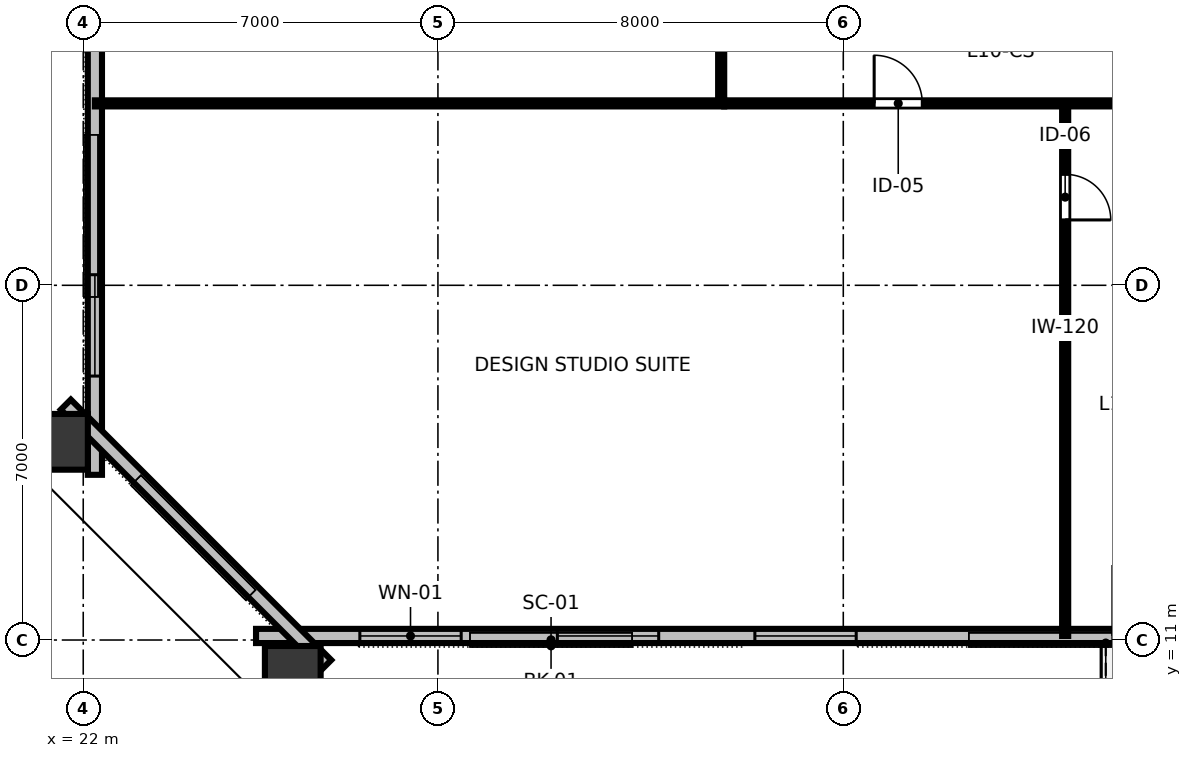
"""IFC4 building model, lengths in metres.
Left out: names, types, materials, properties, quantities, classifications, styles, units other than length and angle.
Written with IfcOpenShell. Run it as: python <this file> out.ifc"""

import sys

from ifc_helpers import new_model, si_unit, direction, frame, frame_2d, origin, origin_2d, place, context, subcontext, project, spatial, rectangle, hollow_rectangle, extrude, element, fill, save


model = new_model("IFC4")
c1 = context("Model", 3, precision=1e-05, world=origin(), true_north=direction((0.0, 1.0)))
c2 = subcontext(c1, "Body", "Model", "MODEL_VIEW")
j1 = project(units=[si_unit("LENGTHUNIT", "METRE"), si_unit("PLANEANGLEUNIT", "RADIAN")], contexts=[c1])
p1 = place(None, origin())
s1 = spatial("IfcSite", under=j1, at=p1, CompositionType="ELEMENT")
p2 = place(p1, origin())
s2 = spatial("IfcBuilding", under=s1, at=p2, CompositionType="ELEMENT")
p3 = place(p2, frame((0.0, 0.0, 42.4)))
s3 = spatial("IfcBuildingStorey", under=s2, at=p3, CompositionType="ELEMENT", Elevation=42.4)
for number, where, z_axis, x_axis in (
    (1, (26.135, 10.232, 0.0), (0.0, 0.0, 1.0), (1.0, 0.0, 0.0)),
    (2, (21.441, 14.911, 0.0), (0.0, 0.0, 1.0), (0.0, 1.0, 0.0)),
):
    element("IfcColumn", number, at=place(p3, frame(where, z_axis=z_axis, x_axis=x_axis)), inside=s3, PredefinedType="COLUMN", context=c2, shape_type="SweptSolid", body=[
        extrude(hollow_rectangle(XDim=1.1, YDim=1.3, WallThickness=0.07, at=origin_2d()), origin(), (0.0, 0.0, 1.0), 3.148),
    ])
p4 = place(p3, frame((25.41, 11.08, 0.0), z_axis=(0.0, 0.0, 1.0), x_axis=(1.0, 0.0, 0.0)))
e3 = element("IfcWall", 3, at=p4, inside=s3, PredefinedType="STANDARD", context=c2, shape_type="SweptSolid", body=[
    extrude(rectangle(XDim=41.18, YDim=0.28, at=frame_2d((20.59, 0.0))), origin(), (0.0, 0.0, 1.0), 3.15),
])
p5 = place(p4, frame((16.91, 0.0, 0.0)))
e4 = element("IfcOpeningElement", 4, at=p5, cuts=e3, PredefinedType="OPENING", context=c2, shape_type="SweptSolid", body=[
    extrude(rectangle(XDim=1.4, YDim=2.15, at=frame_2d((0.7, 1.075))), frame((0.0, 0.15, 0.0), z_axis=(0.0, -1.0, 0.0), x_axis=(1.0, 0.0, 0.0)), (0.0, 0.0, 1.0), 0.3),
])
p6 = place(p4, frame((2.049, 0.0, 0.8)))
e5 = element("IfcOpeningElement", 5, at=p6, cuts=e3, PredefinedType="OPENING", context=c2, shape_type="SweptSolid", body=[
    extrude(rectangle(XDim=2.0, YDim=1.95, at=frame_2d((1.0, 0.975))), frame((0.0, 0.15, 0.0), z_axis=(0.0, -1.0, 0.0), x_axis=(1.0, 0.0, 0.0)), (0.0, 0.0, 1.0), 0.3),
])
p7 = place(p4, frame((5.947, 0.0, 0.8)))
e6 = element("IfcOpeningElement", 6, at=p7, cuts=e3, PredefinedType="OPENING", context=c2, shape_type="SweptSolid", body=[
    extrude(rectangle(XDim=2.0, YDim=1.95, at=frame_2d((1.0, 0.975))), frame((0.0, 0.15, 0.0), z_axis=(0.0, -1.0, 0.0), x_axis=(1.0, 0.0, 0.0)), (0.0, 0.0, 1.0), 0.3),
])
p8 = place(p4, frame((9.845, 0.0, 0.8)))
e7 = element("IfcOpeningElement", 7, at=p8, cuts=e3, PredefinedType="OPENING", context=c2, shape_type="SweptSolid", body=[
    extrude(rectangle(XDim=2.0, YDim=1.95, at=frame_2d((1.0, 0.975))), frame((0.0, 0.15, 0.0), z_axis=(0.0, -1.0, 0.0), x_axis=(1.0, 0.0, 0.0)), (0.0, 0.0, 1.0), 0.3),
])
p9 = place(p4, frame((25.437, 0.0, 0.8)))
e8 = element("IfcOpeningElement", 8, at=p9, cuts=e3, PredefinedType="OPENING", context=c2, shape_type="SweptSolid", body=[
    extrude(rectangle(XDim=2.0, YDim=1.95, at=frame_2d((1.0, 0.975))), frame((0.0, 0.15, 0.0), z_axis=(0.0, -1.0, 0.0), x_axis=(1.0, 0.0, 0.0)), (0.0, 0.0, 1.0), 0.3),
])
p10 = place(p4, frame((29.335, 0.0, 0.8)))
e9 = element("IfcOpeningElement", 9, at=p10, cuts=e3, PredefinedType="OPENING", context=c2, shape_type="SweptSolid", body=[
    extrude(rectangle(XDim=2.0, YDim=1.95, at=frame_2d((1.0, 0.975))), frame((0.0, 0.15, 0.0), z_axis=(0.0, -1.0, 0.0), x_axis=(1.0, 0.0, 0.0)), (0.0, 0.0, 1.0), 0.3),
])
p11 = place(p4, frame((33.233, 0.0, 0.8)))
e10 = element("IfcOpeningElement", 10, at=p11, cuts=e3, PredefinedType="OPENING", context=c2, shape_type="SweptSolid", body=[
    extrude(rectangle(XDim=2.0, YDim=1.95, at=frame_2d((1.0, 0.975))), frame((0.0, 0.15, 0.0), z_axis=(0.0, -1.0, 0.0), x_axis=(1.0, 0.0, 0.0)), (0.0, 0.0, 1.0), 0.3),
])
p12 = place(p4, frame((37.131, 0.0, 0.8)))
e11 = element("IfcOpeningElement", 11, at=p12, cuts=e3, PredefinedType="OPENING", context=c2, shape_type="SweptSolid", body=[
    extrude(rectangle(XDim=2.0, YDim=1.95, at=frame_2d((1.0, 0.975))), frame((0.0, 0.15, 0.0), z_axis=(0.0, -1.0, 0.0), x_axis=(1.0, 0.0, 0.0)), (0.0, 0.0, 1.0), 0.3),
])
p13 = place(p3, frame((22.23, 49.74, 0.0), z_axis=(0.0, 0.0, 1.0), x_axis=(0.0, -1.0, 0.0)))
e12 = element("IfcWall", 12, at=p13, inside=s3, PredefinedType="STANDARD", context=c2, shape_type="SweptSolid", body=[
    extrude(rectangle(XDim=35.48, YDim=0.28, at=frame_2d((17.74, 0.0))), origin(), (0.0, 0.0, 1.0), 3.15),
])
p14 = place(p13, frame((1.949, 0.0, 0.8)))
e13 = element("IfcOpeningElement", 13, at=p14, cuts=e12, PredefinedType="OPENING", context=c2, shape_type="SweptSolid", body=[
    extrude(rectangle(XDim=2.0, YDim=1.95, at=frame_2d((1.0, 0.975))), frame((0.0, 0.15, 0.0), z_axis=(0.0, -1.0, 0.0), x_axis=(1.0, 0.0, 0.0)), (0.0, 0.0, 1.0), 0.3),
])
p15 = place(p13, frame((9.344, 0.0, 0.8)))
e14 = element("IfcOpeningElement", 14, at=p15, cuts=e12, PredefinedType="OPENING", context=c2, shape_type="SweptSolid", body=[
    extrude(rectangle(XDim=2.0, YDim=1.95, at=frame_2d((1.0, 0.975))), frame((0.0, 0.15, 0.0), z_axis=(0.0, -1.0, 0.0), x_axis=(1.0, 0.0, 0.0)), (0.0, 0.0, 1.0), 0.3),
])
p16 = place(p13, frame((24.135, 0.0, 0.8)))
e15 = element("IfcOpeningElement", 15, at=p16, cuts=e12, PredefinedType="OPENING", context=c2, shape_type="SweptSolid", body=[
    extrude(rectangle(XDim=2.0, YDim=1.95, at=frame_2d((1.0, 0.975))), frame((0.0, 0.15, 0.0), z_axis=(0.0, -1.0, 0.0), x_axis=(1.0, 0.0, 0.0)), (0.0, 0.0, 1.0), 0.3),
])
p17 = place(p13, frame((31.531, 0.0, 0.8)))
e16 = element("IfcOpeningElement", 16, at=p17, cuts=e12, PredefinedType="OPENING", context=c2, shape_type="SweptSolid", body=[
    extrude(rectangle(XDim=2.0, YDim=1.95, at=frame_2d((1.0, 0.975))), frame((0.0, 0.15, 0.0), z_axis=(0.0, -1.0, 0.0), x_axis=(1.0, 0.0, 0.0)), (0.0, 0.0, 1.0), 0.3),
])
p18 = place(p3, frame((21.656, 15.646, 0.0), z_axis=(0.0, 0.0, 1.0), x_axis=(0.707106781187, -0.707106781187, 0.0)))
e17 = element("IfcWall", 17, at=p18, inside=s3, PredefinedType="STANDARD", context=c2, shape_type="SweptSolid", body=[
    extrude(rectangle(XDim=7.268, YDim=0.28, at=frame_2d((3.634, 0.0))), origin(), (0.0, 0.0, 1.0), 3.15),
])
p19 = place(p3, frame((41.379, 21.59, 0.0), z_axis=(0.0, 0.0, 1.0), x_axis=(0.0, -1.0, 0.0)))
e18 = element("IfcWall", 18, at=p19, inside=s3, PredefinedType="PARTITIONING", context=c2, shape_type="SweptSolid", body=[
    extrude(rectangle(XDim=10.51, YDim=0.12, at=frame_2d((5.255, 0.0))), origin(), (0.0, 0.0, 1.0), 2.43),
])
p20 = place(p19, frame((1.4, 0.0, 0.0)))
e19 = element("IfcOpeningElement", 19, at=p20, cuts=e18, PredefinedType="OPENING", context=c2, shape_type="SweptSolid", body=[
    extrude(rectangle(XDim=0.9, YDim=2.15, at=frame_2d((0.45, 1.075))), frame((0.0, 0.07, 0.0), z_axis=(0.0, -1.0, 0.0), x_axis=(1.0, 0.0, 0.0)), (0.0, 0.0, 1.0), 0.14),
])
p21 = place(p3, frame((34.65, 21.59, 0.0), z_axis=(0.0, 0.0, 1.0), x_axis=(1.0, 0.0, 0.0)))
e20 = element("IfcWall", 20, at=p21, inside=s3, PredefinedType="PARTITIONING", context=c2, shape_type="SweptSolid", body=[
    extrude(rectangle(XDim=22.7, YDim=0.12, at=frame_2d((11.35, 0.0))), origin(), (0.0, 0.0, 1.0), 2.43),
])
p22 = place(p21, frame((2.959, 0.0, 0.0)))
e21 = element("IfcOpeningElement", 21, at=p22, cuts=e20, PredefinedType="OPENING", context=c2, shape_type="SweptSolid", body=[
    extrude(rectangle(XDim=0.95, YDim=2.15, at=frame_2d((0.475, 1.075))), frame((0.0, 0.07, 0.0), z_axis=(0.0, -1.0, 0.0), x_axis=(1.0, 0.0, 0.0)), (0.0, 0.0, 1.0), 0.14),
])
p23 = place(p21, frame((7.709, 0.0, 0.0)))
e22 = element("IfcOpeningElement", 22, at=p23, cuts=e20, PredefinedType="OPENING", context=c2, shape_type="SweptSolid", body=[
    extrude(rectangle(XDim=0.95, YDim=2.15, at=frame_2d((0.475, 1.075))), frame((0.0, 0.07, 0.0), z_axis=(0.0, -1.0, 0.0), x_axis=(1.0, 0.0, 0.0)), (0.0, 0.0, 1.0), 0.14),
])
p24 = place(p21, frame((11.204, 0.0, 0.0)))
e23 = element("IfcOpeningElement", 23, at=p24, cuts=e20, PredefinedType="OPENING", context=c2, shape_type="SweptSolid", body=[
    extrude(rectangle(XDim=0.95, YDim=2.15, at=frame_2d((0.475, 1.075))), frame((0.0, 0.07, 0.0), z_axis=(0.0, -1.0, 0.0), x_axis=(1.0, 0.0, 0.0)), (0.0, 0.0, 1.0), 0.14),
])
p25 = place(p21, frame((17.665, 0.0, 0.0)))
e24 = element("IfcOpeningElement", 24, at=p25, cuts=e20, PredefinedType="OPENING", context=c2, shape_type="SweptSolid", body=[
    extrude(rectangle(XDim=0.95, YDim=2.15, at=frame_2d((0.475, 1.075))), frame((0.0, 0.07, 0.0), z_axis=(0.0, -1.0, 0.0), x_axis=(1.0, 0.0, 0.0)), (0.0, 0.0, 1.0), 0.14),
])
p26 = place(p3, frame((34.59, 21.65, 0.0), z_axis=(0.0, 0.0, 1.0), x_axis=(0.0, 1.0, 0.0)))
e25 = element("IfcWall", 25, at=p26, inside=s3, PredefinedType="PARTITIONING", context=c2, shape_type="SweptSolid", body=[
    extrude(rectangle(XDim=20.7, YDim=0.12, at=frame_2d((10.35, 0.0))), origin(), (0.0, 0.0, 1.0), 2.43),
])
p27 = place(p26, frame((3.402, 0.0, 0.0)))
e26 = element("IfcOpeningElement", 26, at=p27, cuts=e25, PredefinedType="OPENING", context=c2, shape_type="SweptSolid", body=[
    extrude(rectangle(XDim=0.95, YDim=2.15, at=frame_2d((0.475, 1.075))), frame((0.0, 0.07, 0.0), z_axis=(0.0, -1.0, 0.0), x_axis=(1.0, 0.0, 0.0)), (0.0, 0.0, 1.0), 0.14),
])
p28 = place(p26, frame((9.912, 0.0, 0.0)))
e27 = element("IfcOpeningElement", 27, at=p28, cuts=e25, PredefinedType="OPENING", context=c2, shape_type="SweptSolid", body=[
    extrude(rectangle(XDim=0.95, YDim=2.15, at=frame_2d((0.475, 1.075))), frame((0.0, 0.07, 0.0), z_axis=(0.0, -1.0, 0.0), x_axis=(1.0, 0.0, 0.0)), (0.0, 0.0, 1.0), 0.14),
])
p29 = place(p26, frame((16.385, 0.0, 0.0)))
e28 = element("IfcOpeningElement", 28, at=p29, cuts=e25, PredefinedType="OPENING", context=c2, shape_type="SweptSolid", body=[
    extrude(rectangle(XDim=0.95, YDim=2.15, at=frame_2d((0.475, 1.075))), frame((0.0, 0.07, 0.0), z_axis=(0.0, -1.0, 0.0), x_axis=(1.0, 0.0, 0.0)), (0.0, 0.0, 1.0), 0.14),
])
p30 = place(p3, frame((34.65, 21.59, 0.0), z_axis=(0.0, 0.0, 1.0), x_axis=(-1.0, 0.0, 0.0)))
e29 = element("IfcWall", 29, at=p30, inside=s3, PredefinedType="PARTITIONING", context=c2, shape_type="SweptSolid", body=[
    extrude(rectangle(XDim=12.42, YDim=0.12, at=frame_2d((6.21, 0.0))), origin(), (0.0, 0.0, 1.0), 2.43),
])
p31 = place(p6, origin())
e30 = element("IfcWindow", 30, at=p31, inside=s3, PartitioningType="SINGLE_PANEL", PredefinedType="WINDOW", context=c2, shape_type="SweptSolid", body=[
    extrude(rectangle(XDim=2.0, YDim=1.95, at=frame_2d((1.0, 0.975))), frame((0.0, 0.03, 0.0), z_axis=(0.0, -1.0, 0.0), x_axis=(1.0, 0.0, 0.0)), (0.0, 0.0, 1.0), 0.06),
])
fill(e5, e30)
p32 = place(p7, origin())
e31 = element("IfcWindow", 31, at=p32, inside=s3, PartitioningType="SINGLE_PANEL", PredefinedType="WINDOW", context=c2, shape_type="SweptSolid", body=[
    extrude(rectangle(XDim=2.0, YDim=1.95, at=frame_2d((1.0, 0.975))), frame((0.0, 0.03, 0.0), z_axis=(0.0, -1.0, 0.0), x_axis=(1.0, 0.0, 0.0)), (0.0, 0.0, 1.0), 0.06),
])
fill(e6, e31)
p33 = place(p8, origin())
e32 = element("IfcWindow", 32, at=p33, inside=s3, PartitioningType="SINGLE_PANEL", PredefinedType="WINDOW", context=c2, shape_type="SweptSolid", body=[
    extrude(rectangle(XDim=2.0, YDim=1.95, at=frame_2d((1.0, 0.975))), frame((0.0, 0.03, 0.0), z_axis=(0.0, -1.0, 0.0), x_axis=(1.0, 0.0, 0.0)), (0.0, 0.0, 1.0), 0.06),
])
fill(e7, e32)
p34 = place(p17, origin())
e33 = element("IfcWindow", 33, at=p34, inside=s3, PartitioningType="SINGLE_PANEL", PredefinedType="WINDOW", context=c2, shape_type="SweptSolid", body=[
    extrude(rectangle(XDim=2.0, YDim=1.95, at=frame_2d((1.0, 0.975))), frame((0.0, 0.03, 0.0), z_axis=(0.0, -1.0, 0.0), x_axis=(1.0, 0.0, 0.0)), (0.0, 0.0, 1.0), 0.06),
])
fill(e16, e33)
p35 = place(p20, origin())
e34 = element("IfcDoor", 34, at=p35, inside=s3, OperationType="SINGLE_SWING_RIGHT", PredefinedType="DOOR", context=c2, shape_type="SweptSolid", body=[
    extrude(rectangle(XDim=0.9, YDim=2.15, at=frame_2d((0.45, 1.075))), frame((0.0, 0.025, 0.0), z_axis=(0.0, -1.0, 0.0), x_axis=(1.0, 0.0, 0.0)), (0.0, 0.0, 1.0), 0.05),
])
fill(e19, e34)
p36 = place(p22, origin())
e35 = element("IfcDoor", 35, at=p36, inside=s3, OperationType="SINGLE_SWING_LEFT", PredefinedType="DOOR", context=c2, shape_type="SweptSolid", body=[
    extrude(rectangle(XDim=0.95, YDim=2.15, at=frame_2d((0.475, 1.075))), frame((0.0, 0.025, 0.0), z_axis=(0.0, -1.0, 0.0), x_axis=(1.0, 0.0, 0.0)), (0.0, 0.0, 1.0), 0.05),
])
fill(e21, e35)
save(model, sys.argv[1])
